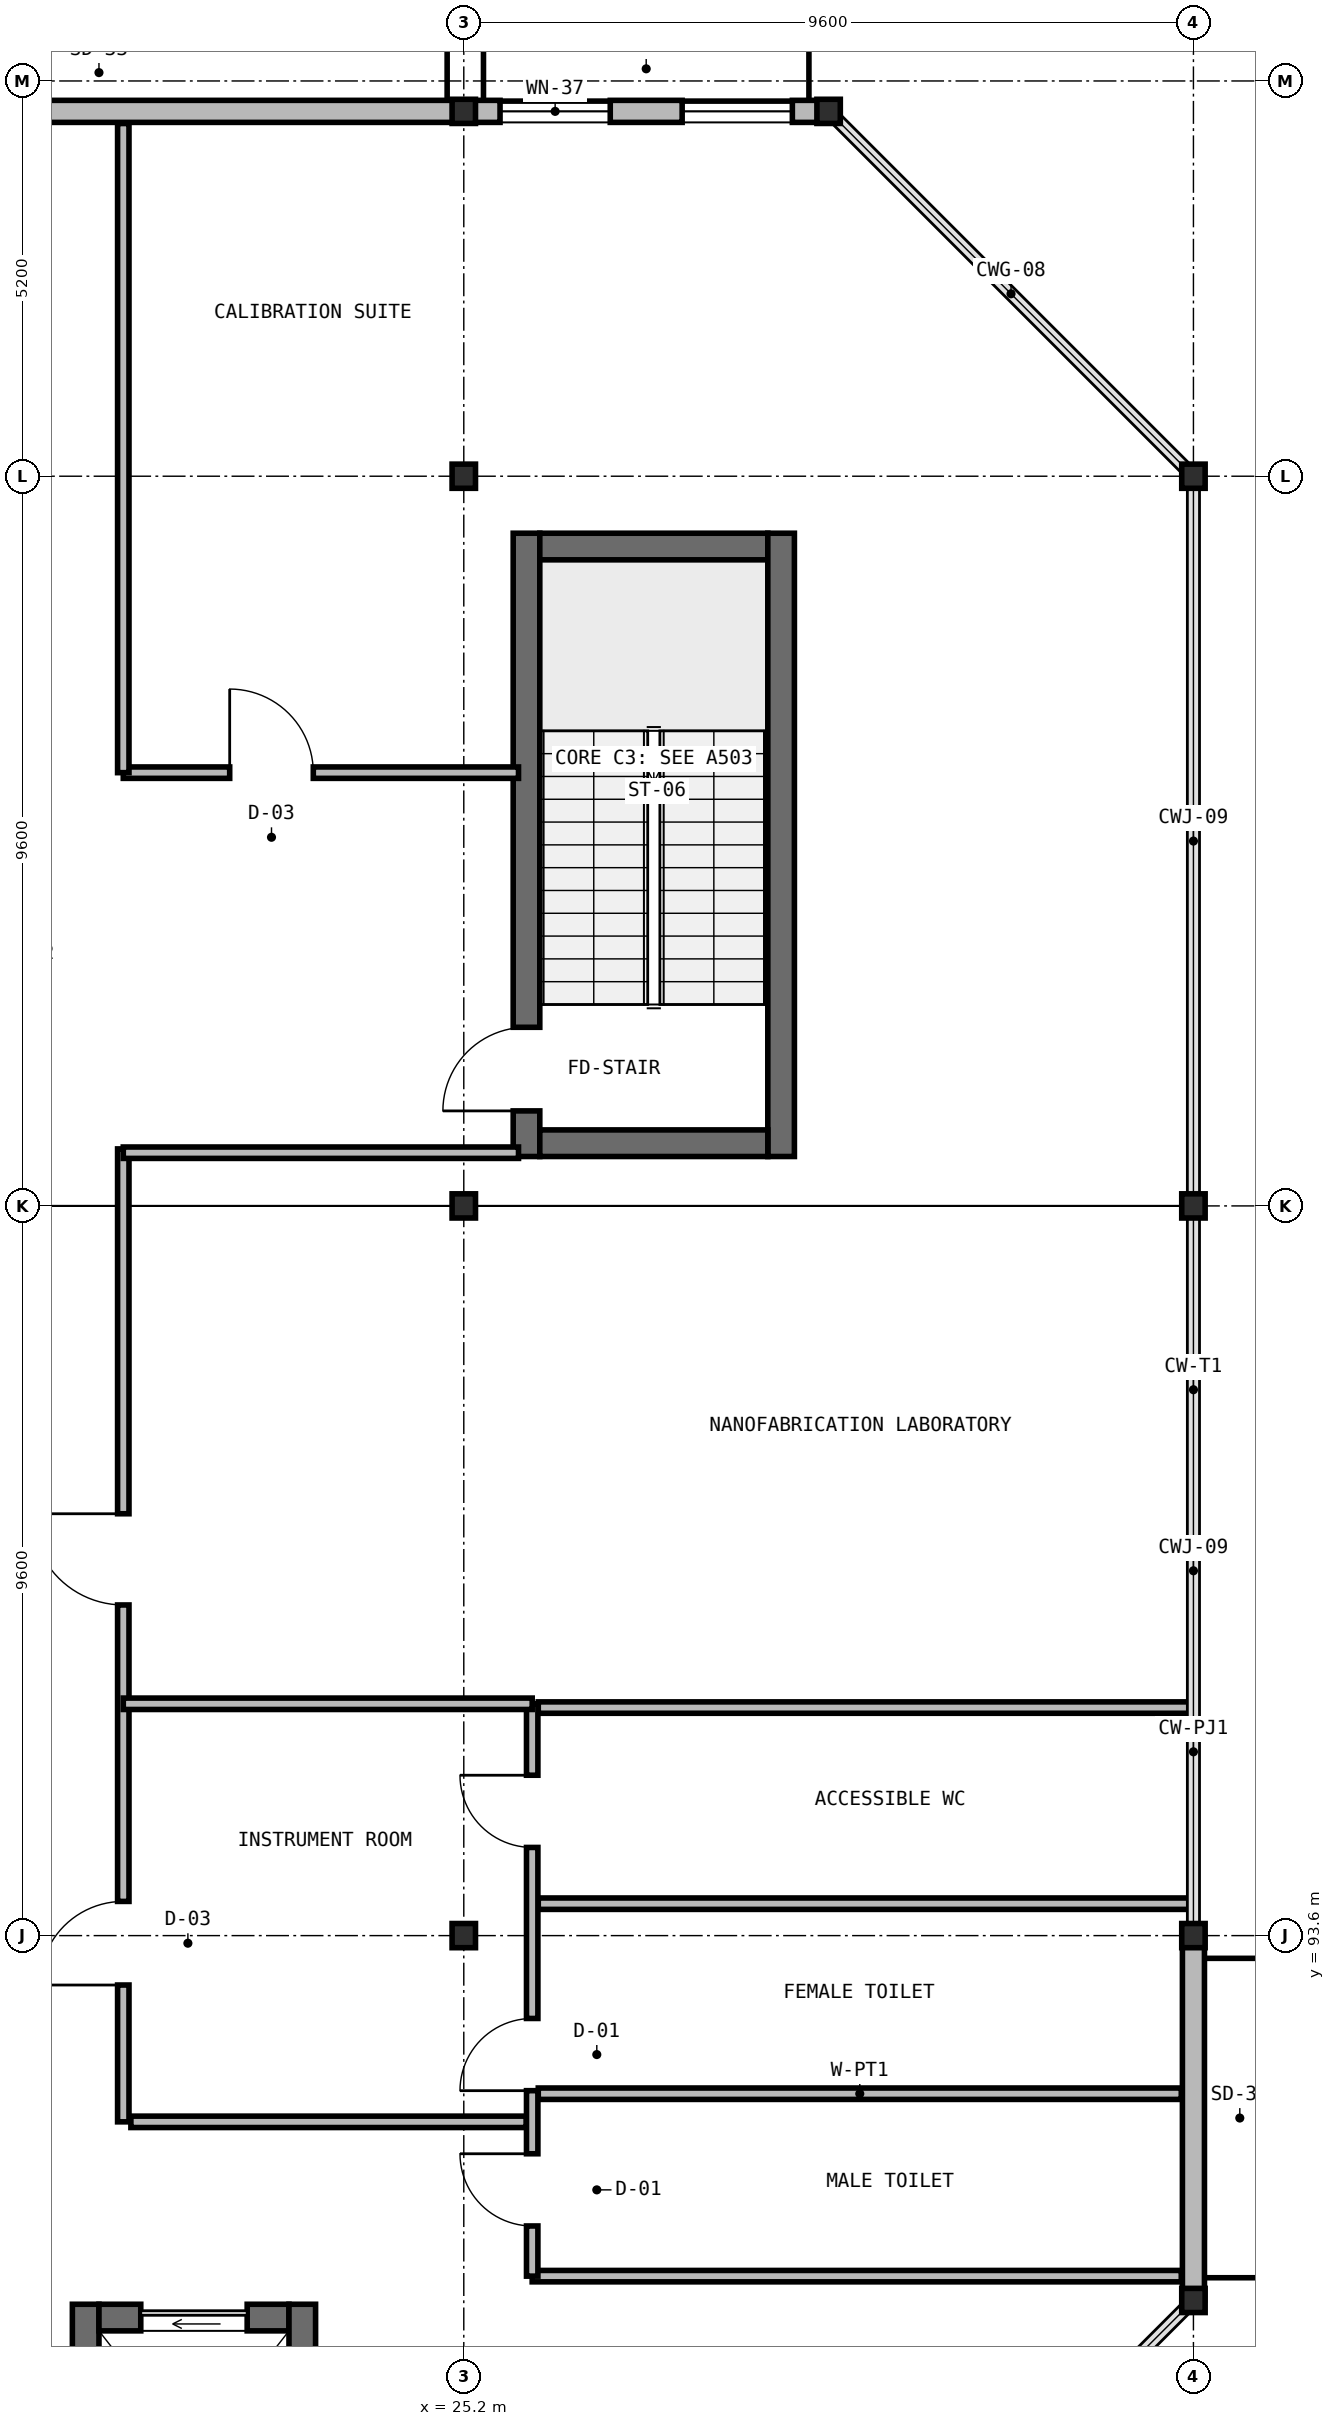
"""IFC4 building model, lengths in metres.
Left out: names, types, materials, properties, quantities, classifications, styles, units other than length and angle.
Written with IfcOpenShell. Run it as: python <this file> out.ifc"""

import sys

from ifc_helpers import new_model, si_unit, direction, frame, frame_2d, origin, origin_2d, place, context, subcontext, project, spatial, rectangle, i_section, extrude, element, fill, save


model = new_model("IFC4")
c1 = context("Model", 3, precision=1e-05, world=origin(), true_north=direction((0.0, 1.0)))
c2 = subcontext(c1, "Body", "Model", "MODEL_VIEW")
j1 = project(units=[si_unit("LENGTHUNIT", "METRE"), si_unit("PLANEANGLEUNIT", "RADIAN")], contexts=[c1])
p1 = place(None, origin())
s1 = spatial("IfcSite", under=j1, at=p1, CompositionType="ELEMENT")
p2 = place(p1, origin())
s2 = spatial("IfcBuilding", under=s1, at=p2, CompositionType="ELEMENT")
p3 = place(p2, frame((0.0, 0.0, 18.9)))
s3 = spatial("IfcBuildingStorey", under=s2, at=p3, CompositionType="ELEMENT", Elevation=18.9)
p4 = place(p3, frame((26.025, 103.85, 0.0), z_axis=(0.0, 0.0, 1.0), x_axis=(0.0, 1.0, 0.0)))
e1 = element("IfcWall", 1, at=p4, inside=s3, PredefinedType="SHEAR", context=c2, shape_type="SweptSolid", body=[
    extrude(rectangle(XDim=8.2, YDim=0.35, at=frame_2d((4.1, 0.0))), origin(), (0.0, 0.0, 1.0), 4.55),
])
p5 = place(p4, frame((0.6, 0.0, 0.0)))
e2 = element("IfcOpeningElement", 2, at=p5, cuts=e1, PredefinedType="OPENING", context=c2, shape_type="SweptSolid", body=[
    extrude(rectangle(XDim=1.1, YDim=2.15, at=frame_2d((0.55, 1.075))), frame((0.0, 0.185, 0.0), z_axis=(0.0, -1.0, 0.0), x_axis=(1.0, 0.0, 0.0)), (0.0, 0.0, 1.0), 0.37),
])
p6 = place(p3, frame((26.2, 111.875, 0.0), z_axis=(0.0, 0.0, 1.0), x_axis=(1.0, 0.0, 0.0)))
e3 = element("IfcWall", 3, at=p6, inside=s3, PredefinedType="SHEAR", context=c2, shape_type="SweptSolid", body=[
    extrude(rectangle(XDim=3.0, YDim=0.35, at=frame_2d((1.5, 0.0))), origin(), (0.0, 0.0, 1.0), 4.55),
])
p7 = place(p3, frame((29.375, 112.05, 0.0), z_axis=(0.0, 0.0, 1.0), x_axis=(0.0, -1.0, 0.0)))
e4 = element("IfcWall", 4, at=p7, inside=s3, PredefinedType="SHEAR", context=c2, shape_type="SweptSolid", body=[
    extrude(rectangle(XDim=8.2, YDim=0.35, at=frame_2d((4.1, 0.0))), origin(), (0.0, 0.0, 1.0), 4.55),
])
p8 = place(p3, frame((29.2, 104.025, 0.0), z_axis=(0.0, 0.0, 1.0), x_axis=(-1.0, 0.0, 0.0)))
e5 = element("IfcWall", 5, at=p8, inside=s3, PredefinedType="SHEAR", context=c2, shape_type="SweptSolid", body=[
    extrude(rectangle(XDim=3.0, YDim=0.35, at=frame_2d((1.5, 0.0))), origin(), (0.0, 0.0, 1.0), 4.55),
])
p9 = place(p3, frame((20.225, 84.85, 0.0), z_axis=(0.0, 0.0, 1.0), x_axis=(0.0, 1.0, 0.0)))
e6 = element("IfcWall", 6, at=p9, inside=s3, PredefinedType="SHEAR", context=c2, shape_type="SweptSolid", body=[
    extrude(rectangle(XDim=3.9, YDim=0.35, at=frame_2d((1.95, 0.0))), origin(), (0.0, 0.0, 1.0), 4.55),
])
p10 = place(p3, frame((20.4, 88.575, 0.0), z_axis=(0.0, 0.0, 1.0), x_axis=(1.0, 0.0, 0.0)))
e7 = element("IfcWall", 7, at=p10, inside=s3, PredefinedType="SHEAR", context=c2, shape_type="SweptSolid", body=[
    extrude(rectangle(XDim=2.5, YDim=0.35, at=frame_2d((1.25, 0.0))), origin(), (0.0, 0.0, 1.0), 4.55),
])
p11 = place(p10, frame((0.55, 0.0, 0.0)))
e8 = element("IfcOpeningElement", 8, at=p11, cuts=e7, PredefinedType="OPENING", context=c2, shape_type="SweptSolid", body=[
    extrude(rectangle(XDim=1.4, YDim=2.3, at=frame_2d((0.7, 1.15))), frame((0.0, 0.185, 0.0), z_axis=(0.0, -1.0, 0.0), x_axis=(1.0, 0.0, 0.0)), (0.0, 0.0, 1.0), 0.37),
])
p12 = place(p3, frame((23.075, 88.75, 0.0), z_axis=(0.0, 0.0, 1.0), x_axis=(0.0, -1.0, 0.0)))
e9 = element("IfcWall", 9, at=p12, inside=s3, PredefinedType="SHEAR", context=c2, shape_type="SweptSolid", body=[
    extrude(rectangle(XDim=3.9, YDim=0.35, at=frame_2d((1.95, 0.0))), origin(), (0.0, 0.0, 1.0), 4.55),
])
for number, where, z_axis, x_axis in (
    (10, (25.2, 93.6, 0.0), (0.0, 0.0, 1.0), (1.0, 0.0, 0.0)),
    (11, (25.2, 103.2, 0.0), (0.0, 0.0, 1.0), (1.0, 0.0, 0.0)),
    (12, (25.2, 112.8, 0.0), (0.0, 0.0, 1.0), (1.0, 0.0, 0.0)),
    (13, (25.2, 117.6, 0.0), (0.0, 0.0, 1.0), (1.0, 0.0, 0.0)),
    (14, (34.8, 93.6, 0.0), (0.0, 0.0, 1.0), (1.0, 0.0, 0.0)),
    (15, (34.8, 103.2, 0.0), (0.0, 0.0, 1.0), (1.0, 0.0, 0.0)),
    (16, (34.8, 112.8, 0.0), (0.0, 0.0, 1.0), (1.0, 0.0, 0.0)),
    (17, (34.8, 88.8, 0.0), (0.0, 0.0, 1.0), (1.0, 0.0, 0.0)),
    (18, (30.0, 117.6, 0.0), (0.0, 0.0, 1.0), (1.0, 0.0, 0.0)),
):
    element("IfcColumn", number, at=place(p3, frame(where, z_axis=z_axis, x_axis=x_axis)), inside=s3, PredefinedType="COLUMN", context=c2, shape_type="SweptSolid", body=[
        extrude(i_section(OverallWidth=0.308, OverallDepth=0.318, WebThickness=0.013, FlangeThickness=0.021, at=origin_2d()), origin(), (0.0, 0.0, 1.0), 4.55),
    ])
p13 = place(p3, frame((15.604, 117.6, 0.0), z_axis=(0.0, 0.0, 1.0), x_axis=(1.0, 0.0, 0.0)))
e19 = element("IfcWall", 19, at=p13, inside=s3, PredefinedType="SOLIDWALL", context=c2, shape_type="SweptSolid", body=[
    extrude(rectangle(XDim=9.592, YDim=0.29, at=frame_2d((4.796, 0.0))), origin(), (0.0, 0.0, 1.0), 3.837),
])
p14 = place(p3, frame((25.204, 117.6, 0.0), z_axis=(0.0, 0.0, 1.0), x_axis=(1.0, 0.0, 0.0)))
e20 = element("IfcWall", 20, at=p14, inside=s3, PredefinedType="SOLIDWALL", context=c2, shape_type="SweptSolid", body=[
    extrude(rectangle(XDim=4.792, YDim=0.29, at=frame_2d((2.396, 0.0))), origin(), (0.0, 0.0, 1.0), 4.37),
])
p15 = place(p14, frame((0.473, 0.0, 0.95)))
e21 = element("IfcOpeningElement", 21, at=p15, cuts=e20, PredefinedType="OPENING", context=c2, shape_type="SweptSolid", body=[
    extrude(rectangle(XDim=1.45, YDim=1.75, at=frame_2d((0.725, 0.875))), frame((0.0, 0.155, 0.0), z_axis=(0.0, -1.0, 0.0), x_axis=(1.0, 0.0, 0.0)), (0.0, 0.0, 1.0), 0.31),
])
p16 = place(p14, frame((2.869, 0.0, 0.95)))
e22 = element("IfcOpeningElement", 22, at=p16, cuts=e20, PredefinedType="OPENING", context=c2, shape_type="SweptSolid", body=[
    extrude(rectangle(XDim=1.45, YDim=1.75, at=frame_2d((0.725, 0.875))), frame((0.0, 0.155, 0.0), z_axis=(0.0, -1.0, 0.0), x_axis=(1.0, 0.0, 0.0)), (0.0, 0.0, 1.0), 0.31),
])
p17 = place(p3, frame((34.8, 93.596, 0.0), z_axis=(0.0, 0.0, 1.0), x_axis=(0.0, -1.0, 0.0)))
e23 = element("IfcWall", 23, at=p17, inside=s3, PredefinedType="SOLIDWALL", context=c2, shape_type="SweptSolid", body=[
    extrude(rectangle(XDim=4.792, YDim=0.29, at=frame_2d((2.396, 0.0))), origin(), (0.0, 0.0, 1.0), 4.37),
])
p18 = place(p3, frame((26.18, 91.52, 0.0), z_axis=(0.0, 0.0, 1.0), x_axis=(1.0, 0.0, 0.0)))
e24 = element("IfcWall", 24, at=p18, inside=s3, PredefinedType="PARTITIONING", context=c2, shape_type="SweptSolid", body=[
    extrude(rectangle(XDim=8.46, YDim=0.15, at=frame_2d((4.23, 0.0))), origin(), (0.0, 0.0, 1.0), 4.3),
])
for number, where, z_axis, x_axis in (
    (25, (26.18, 94.02, 0.0), (0.0, 0.0, 1.0), (1.0, 0.0, 0.0)),
    (26, (26.18, 96.6, 0.0), (0.0, 0.0, 1.0), (1.0, 0.0, 0.0)),
):
    element("IfcWall", number, at=place(p3, frame(where, z_axis=z_axis, x_axis=x_axis)), inside=s3, PredefinedType="PARTITIONING", context=c2, shape_type="SweptSolid", body=[
        extrude(rectangle(XDim=8.56, YDim=0.15, at=frame_2d((4.28, 0.0))), origin(), (0.0, 0.0, 1.0), 4.3),
    ])
p19 = place(p3, frame((26.1, 89.12, 0.0), z_axis=(0.0, 0.0, 1.0), x_axis=(1.0, 0.0, 0.0)))
e27 = element("IfcWall", 27, at=p19, inside=s3, PredefinedType="PARTITIONING", context=c2, shape_type="SweptSolid", body=[
    extrude(rectangle(XDim=8.54, YDim=0.15, at=frame_2d((4.27, 0.0))), origin(), (0.0, 0.0, 1.0), 4.3),
])
p20 = place(p3, frame((26.1, 89.12, 0.0), z_axis=(0.0, 0.0, 1.0), x_axis=(0.0, 1.0, 0.0)))
e28 = element("IfcWall", 28, at=p20, inside=s3, PredefinedType="PARTITIONING", context=c2, shape_type="SweptSolid", body=[
    extrude(rectangle(XDim=7.53, YDim=0.15, at=frame_2d((3.765, 0.0))), origin(), (0.0, 0.0, 1.0), 4.3),
])
p21 = place(p20, frame((0.66, 0.0, 0.0)))
e29 = element("IfcOpeningElement", 29, at=p21, cuts=e28, PredefinedType="OPENING", context=c2, shape_type="SweptSolid", body=[
    extrude(rectangle(XDim=0.95, YDim=2.1, at=frame_2d((0.475, 1.05))), frame((0.0, 0.085, 0.0), z_axis=(0.0, -1.0, 0.0), x_axis=(1.0, 0.0, 0.0)), (0.0, 0.0, 1.0), 0.17),
])
p22 = place(p20, frame((2.44, 0.0, 0.0)))
e30 = element("IfcOpeningElement", 30, at=p22, cuts=e28, PredefinedType="OPENING", context=c2, shape_type="SweptSolid", body=[
    extrude(rectangle(XDim=0.95, YDim=2.1, at=frame_2d((0.475, 1.05))), frame((0.0, 0.085, 0.0), z_axis=(0.0, -1.0, 0.0), x_axis=(1.0, 0.0, 0.0)), (0.0, 0.0, 1.0), 0.17),
])
p23 = place(p20, frame((5.64, 0.0, 0.0)))
e31 = element("IfcOpeningElement", 31, at=p23, cuts=e28, PredefinedType="OPENING", context=c2, shape_type="SweptSolid", body=[
    extrude(rectangle(XDim=0.95, YDim=2.1, at=frame_2d((0.475, 1.05))), frame((0.0, 0.085, 0.0), z_axis=(0.0, -1.0, 0.0), x_axis=(1.0, 0.0, 0.0)), (0.0, 0.0, 1.0), 0.17),
])
p24 = place(p3, frame((20.72, 108.9, 0.0), z_axis=(0.0, 0.0, 1.0), x_axis=(1.0, 0.0, 0.0)))
e32 = element("IfcWall", 32, at=p24, inside=s3, PredefinedType="PARTITIONING", context=c2, shape_type="SweptSolid", body=[
    extrude(rectangle(XDim=5.2, YDim=0.15, at=frame_2d((2.6, 0.0))), origin(), (0.0, 0.0, 1.0), 4.3),
])
p25 = place(p24, frame((1.4, 0.0, 0.0)))
e33 = element("IfcOpeningElement", 33, at=p25, cuts=e32, PredefinedType="OPENING", context=c2, shape_type="SweptSolid", body=[
    extrude(rectangle(XDim=1.1, YDim=2.2, at=frame_2d((0.55, 1.1))), frame((0.0, 0.085, 0.0), z_axis=(0.0, -1.0, 0.0), x_axis=(1.0, 0.0, 0.0)), (0.0, 0.0, 1.0), 0.17),
])
p26 = place(p3, frame((20.72, 108.9, 0.0), z_axis=(0.0, 0.0, 1.0), x_axis=(0.0, 1.0, 0.0)))
e34 = element("IfcWall", 34, at=p26, inside=s3, PredefinedType="PARTITIONING", context=c2, shape_type="SweptSolid", body=[
    extrude(rectangle(XDim=8.54, YDim=0.15, at=frame_2d((4.27, 0.0))), origin(), (0.0, 0.0, 1.0), 4.3),
])
p27 = place(p3, frame((20.72, 91.15, 0.0), z_axis=(0.0, 0.0, 1.0), x_axis=(0.0, 1.0, 0.0)))
e35 = element("IfcWall", 35, at=p27, inside=s3, PredefinedType="PARTITIONING", context=c2, shape_type="SweptSolid", body=[
    extrude(rectangle(XDim=12.8, YDim=0.15, at=frame_2d((6.4, 0.0))), origin(), (0.0, 0.0, 1.0), 4.3),
])
p28 = place(p27, frame((1.8, 0.0, 0.0)))
e36 = element("IfcOpeningElement", 36, at=p28, cuts=e35, PredefinedType="OPENING", context=c2, shape_type="SweptSolid", body=[
    extrude(rectangle(XDim=1.1, YDim=2.2, at=frame_2d((0.55, 1.1))), frame((0.0, 0.085, 0.0), z_axis=(0.0, -1.0, 0.0), x_axis=(1.0, 0.0, 0.0)), (0.0, 0.0, 1.0), 0.17),
])
p29 = place(p27, frame((6.8, 0.0, 0.0)))
e37 = element("IfcOpeningElement", 37, at=p29, cuts=e35, PredefinedType="OPENING", context=c2, shape_type="SweptSolid", body=[
    extrude(rectangle(XDim=1.2, YDim=2.2, at=frame_2d((0.6, 1.1))), frame((0.0, 0.085, 0.0), z_axis=(0.0, -1.0, 0.0), x_axis=(1.0, 0.0, 0.0)), (0.0, 0.0, 1.0), 0.17),
])
for number, where, z_axis, x_axis in (
    (38, (20.82, 91.15, 0.0), (0.0, 0.0, 1.0), (1.0, 0.0, 0.0)),
    (39, (20.72, 103.9, 0.0), (0.0, 0.0, 1.0), (1.0, 0.0, 0.0)),
):
    element("IfcWall", number, at=place(p3, frame(where, z_axis=z_axis, x_axis=x_axis)), inside=s3, PredefinedType="PARTITIONING", context=c2, shape_type="SweptSolid", body=[
        extrude(rectangle(XDim=5.2, YDim=0.15, at=frame_2d((2.6, 0.0))), origin(), (0.0, 0.0, 1.0), 4.3),
    ])
p30 = place(p3, frame((20.72, 96.65, 0.0), z_axis=(0.0, 0.0, 1.0), x_axis=(1.0, 0.0, 0.0)))
e40 = element("IfcWall", 40, at=p30, inside=s3, PredefinedType="PARTITIONING", context=c2, shape_type="SweptSolid", body=[
    extrude(rectangle(XDim=5.38, YDim=0.15, at=frame_2d((2.69, 0.0))), origin(), (0.0, 0.0, 1.0), 4.3),
])
p31 = place(p15, origin())
e41 = element("IfcWindow", 41, at=p31, inside=s3, PartitioningType="SINGLE_PANEL", PredefinedType="WINDOW", context=c2, shape_type="SweptSolid", body=[
    extrude(rectangle(XDim=1.45, YDim=1.75, at=frame_2d((0.725, 0.875))), frame((0.0, 0.03, 0.0), z_axis=(0.0, -1.0, 0.0), x_axis=(1.0, 0.0, 0.0)), (0.0, 0.0, 1.0), 0.06),
])
fill(e21, e41)
p32 = place(p16, origin())
e42 = element("IfcWindow", 42, at=p32, inside=s3, PartitioningType="SINGLE_PANEL", PredefinedType="WINDOW", context=c2, shape_type="SweptSolid", body=[
    extrude(rectangle(XDim=1.45, YDim=1.75, at=frame_2d((0.725, 0.875))), frame((0.0, 0.03, 0.0), z_axis=(0.0, -1.0, 0.0), x_axis=(1.0, 0.0, 0.0)), (0.0, 0.0, 1.0), 0.06),
])
fill(e22, e42)
p33 = place(p5, origin())
e43 = element("IfcDoor", 43, at=p33, inside=s3, OperationType="SINGLE_SWING_LEFT", PredefinedType="DOOR", context=c2, shape_type="SweptSolid", body=[
    extrude(rectangle(XDim=1.1, YDim=2.15, at=frame_2d((0.55, 1.075))), frame((0.0, 0.025, 0.0), z_axis=(0.0, -1.0, 0.0), x_axis=(1.0, 0.0, 0.0)), (0.0, 0.0, 1.0), 0.05),
])
fill(e2, e43)
p34 = place(p11, origin())
e44 = element("IfcDoor", 44, at=p34, inside=s3, OperationType="SLIDING_TO_LEFT", PredefinedType="USERDEFINED", context=c2, shape_type="SweptSolid", body=[
    extrude(rectangle(XDim=1.4, YDim=2.3, at=frame_2d((0.7, 1.15))), frame((0.0, 0.025, 0.0), z_axis=(0.0, -1.0, 0.0), x_axis=(1.0, 0.0, 0.0)), (0.0, 0.0, 1.0), 0.05),
])
fill(e8, e44)
p35 = place(p21, origin())
e45 = element("IfcDoor", 45, at=p35, inside=s3, OperationType="SINGLE_SWING_RIGHT", PredefinedType="DOOR", context=c2, shape_type="SweptSolid", body=[
    extrude(rectangle(XDim=0.95, YDim=2.1, at=frame_2d((0.475, 1.05))), frame((0.0, 0.025, 0.0), z_axis=(0.0, -1.0, 0.0), x_axis=(1.0, 0.0, 0.0)), (0.0, 0.0, 1.0), 0.05),
])
fill(e29, e45)
p36 = place(p22, origin())
e46 = element("IfcDoor", 46, at=p36, inside=s3, OperationType="SINGLE_SWING_LEFT", PredefinedType="DOOR", context=c2, shape_type="SweptSolid", body=[
    extrude(rectangle(XDim=0.95, YDim=2.1, at=frame_2d((0.475, 1.05))), frame((0.0, 0.025, 0.0), z_axis=(0.0, -1.0, 0.0), x_axis=(1.0, 0.0, 0.0)), (0.0, 0.0, 1.0), 0.05),
])
fill(e30, e46)
p37 = place(p23, origin())
e47 = element("IfcDoor", 47, at=p37, inside=s3, OperationType="SINGLE_SWING_RIGHT", PredefinedType="DOOR", context=c2, shape_type="SweptSolid", body=[
    extrude(rectangle(XDim=0.95, YDim=2.1, at=frame_2d((0.475, 1.05))), frame((0.0, 0.025, 0.0), z_axis=(0.0, -1.0, 0.0), x_axis=(1.0, 0.0, 0.0)), (0.0, 0.0, 1.0), 0.05),
])
fill(e31, e47)
p38 = place(p25, origin())
e48 = element("IfcDoor", 48, at=p38, inside=s3, OperationType="SINGLE_SWING_LEFT", PredefinedType="DOOR", context=c2, shape_type="SweptSolid", body=[
    extrude(rectangle(XDim=1.1, YDim=2.2, at=frame_2d((0.55, 1.1))), frame((0.0, 0.025, 0.0), z_axis=(0.0, -1.0, 0.0), x_axis=(1.0, 0.0, 0.0)), (0.0, 0.0, 1.0), 0.05),
])
fill(e33, e48)
p39 = place(p28, origin())
e49 = element("IfcDoor", 49, at=p39, inside=s3, OperationType="SINGLE_SWING_LEFT", PredefinedType="DOOR", context=c2, shape_type="SweptSolid", body=[
    extrude(rectangle(XDim=1.1, YDim=2.2, at=frame_2d((0.55, 1.1))), frame((0.0, 0.025, 0.0), z_axis=(0.0, -1.0, 0.0), x_axis=(1.0, 0.0, 0.0)), (0.0, 0.0, 1.0), 0.05),
])
fill(e36, e49)
p40 = place(p29, origin())
e50 = element("IfcDoor", 50, at=p40, inside=s3, OperationType="SINGLE_SWING_RIGHT", PredefinedType="DOOR", context=c2, shape_type="SweptSolid", body=[
    extrude(rectangle(XDim=1.2, YDim=2.2, at=frame_2d((0.6, 1.1))), frame((0.0, 0.025, 0.0), z_axis=(0.0, -1.0, 0.0), x_axis=(1.0, 0.0, 0.0)), (0.0, 0.0, 1.0), 0.05),
])
fill(e37, e50)
save(model, sys.argv[1])
